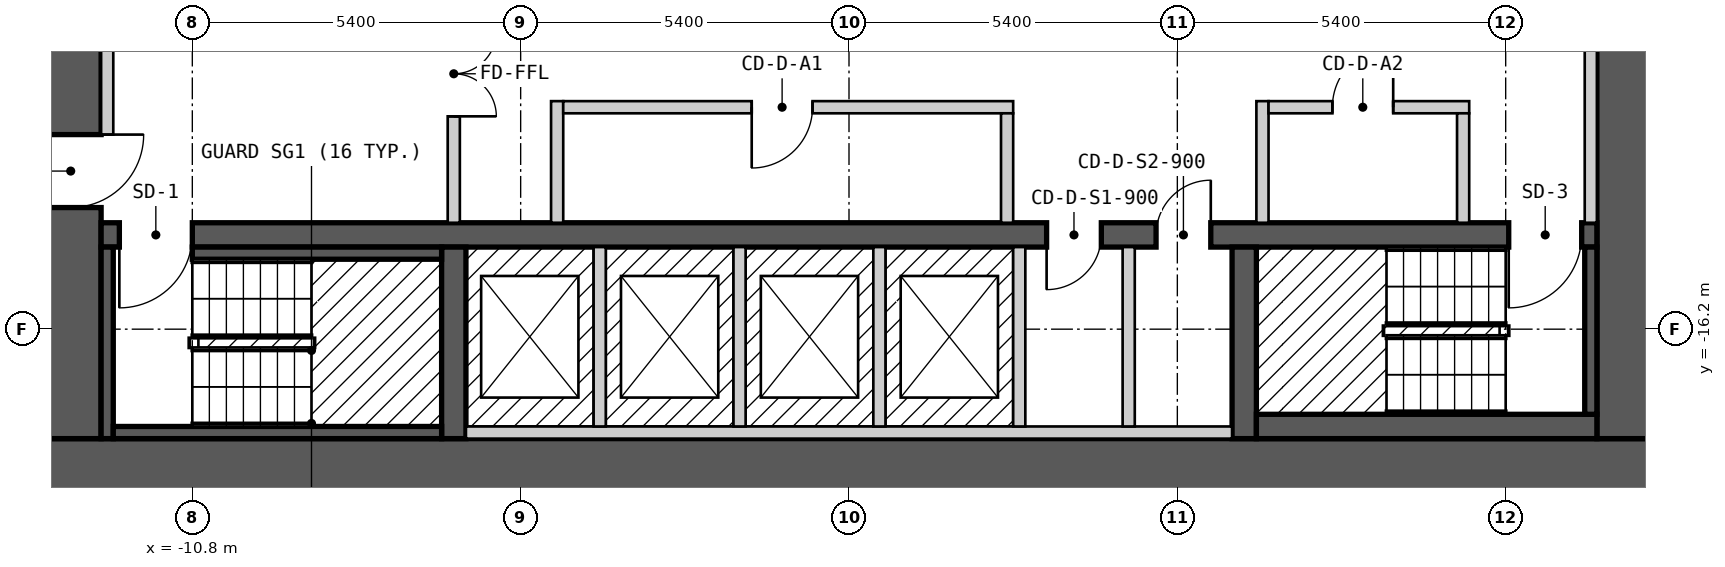
"""IFC4 building model, lengths in metres.
Left out: names, types, materials, properties, quantities, classifications, styles, units other than length and angle.
Written with IfcOpenShell. Run it as: python <this file> out.ifc"""

import sys

from ifc_helpers import new_model, si_unit, direction, frame, frame_2d, origin, place, context, subcontext, project, spatial, rectangle, extrude, element, fill, save


model = new_model("IFC4")
c1 = context("Model", 3, precision=1e-05, world=origin(), true_north=direction((0.0, 1.0)))
c2 = subcontext(c1, "Body", "Model", "MODEL_VIEW")
j1 = project(units=[si_unit("LENGTHUNIT", "METRE"), si_unit("PLANEANGLEUNIT", "RADIAN")], contexts=[c1])
p1 = place(None, origin())
s1 = spatial("IfcSite", under=j1, at=p1, CompositionType="ELEMENT")
p2 = place(p1, origin())
s2 = spatial("IfcBuilding", under=s1, at=p2, CompositionType="ELEMENT")
p3 = place(p2, frame((0.0, 0.0, 81.0)))
s3 = spatial("IfcBuildingStorey", under=s2, at=p3, CompositionType="ELEMENT", Elevation=81.0)
p4 = place(p3, frame((-13.3, -18.5, 0.0), z_axis=(0.0, 0.0, 1.0), x_axis=(1.0, 0.0, 0.0)))
e1 = element("IfcWall", 1, at=p4, inside=s3, PredefinedType="SHEAR", context=c2, shape_type="SweptSolid", body=[
    extrude(rectangle(XDim=26.6, YDim=1.0, at=frame_2d((13.3, 0.0))), origin(), (0.0, 0.0, 1.0), 2.7),
])
p5 = place(p3, frame((-12.8, -18.0, 0.0), z_axis=(0.0, 0.0, 1.0), x_axis=(0.0, 1.0, 0.0)))
e2 = element("IfcWall", 2, at=p5, inside=s3, PredefinedType="SHEAR", context=c2, shape_type="SweptSolid", body=[
    extrude(rectangle(XDim=12.0, YDim=1.0, at=frame_2d((6.0, 0.0))), origin(), (0.0, 0.0, 1.0), 2.7),
])
p6 = place(p5, frame((3.8, 0.0, 0.0)))
e3 = element("IfcOpeningElement", 3, at=p6, cuts=e2, PredefinedType="OPENING", context=c2, shape_type="SweptSolid", body=[
    extrude(rectangle(XDim=1.2, YDim=2.1, at=frame_2d((0.6, 1.05))), frame((0.0, 0.51, 0.0), z_axis=(0.0, -1.0, 0.0), x_axis=(1.0, 0.0, 0.0)), (0.0, 0.0, 1.0), 1.02),
])
p7 = place(p3, frame((12.8, -18.0, 0.0), z_axis=(0.0, 0.0, 1.0), x_axis=(0.0, 1.0, 0.0)))
e4 = element("IfcWall", 4, at=p7, inside=s3, PredefinedType="SHEAR", context=c2, shape_type="SweptSolid", body=[
    extrude(rectangle(XDim=12.0, YDim=1.0, at=frame_2d((6.0, 0.0))), origin(), (0.0, 0.0, 1.0), 2.7),
])
p8 = place(p3, frame((-12.3, -14.65, 0.0), z_axis=(0.0, 0.0, 1.0), x_axis=(1.0, 0.0, 0.0)))
e5 = element("IfcWall", 5, at=p8, inside=s3, PredefinedType="SHEAR", context=c2, shape_type="SweptSolid", body=[
    extrude(rectangle(XDim=24.6, YDim=0.4, at=frame_2d((12.3, 0.0))), origin(), (0.0, 0.0, 1.0), 2.7),
])
p9 = place(p8, frame((1.5, 0.0, 0.0), z_axis=(0.0, 0.0, 1.0), x_axis=(-1.0, 0.0, 0.0)))
e6 = element("IfcOpeningElement", 6, at=p9, cuts=e5, PredefinedType="OPENING", context=c2, shape_type="SweptSolid", body=[
    extrude(rectangle(XDim=1.2, YDim=2.1, at=frame_2d((0.6, 1.05))), frame((0.0, 0.21, 0.0), z_axis=(0.0, -1.0, 0.0), x_axis=(1.0, 0.0, 0.0)), (0.0, 0.0, 1.0), 0.42),
])
p10 = place(p8, frame((24.35, 0.0, 0.0), z_axis=(0.0, 0.0, 1.0), x_axis=(-1.0, 0.0, 0.0)))
e7 = element("IfcOpeningElement", 7, at=p10, cuts=e5, PredefinedType="OPENING", context=c2, shape_type="SweptSolid", body=[
    extrude(rectangle(XDim=1.2, YDim=2.1, at=frame_2d((0.6, 1.05))), frame((0.0, 0.21, 0.0), z_axis=(0.0, -1.0, 0.0), x_axis=(1.0, 0.0, 0.0)), (0.0, 0.0, 1.0), 0.42),
])
p11 = place(p8, frame((16.45, 0.0, 0.0), z_axis=(0.0, 0.0, 1.0), x_axis=(-1.0, 0.0, 0.0)))
e8 = element("IfcOpeningElement", 8, at=p11, cuts=e5, PredefinedType="OPENING", context=c2, shape_type="SweptSolid", body=[
    extrude(rectangle(XDim=0.9, YDim=2.1, at=frame_2d((0.45, 1.05))), frame((0.0, 0.21, 0.0), z_axis=(0.0, -1.0, 0.0), x_axis=(1.0, 0.0, 0.0)), (0.0, 0.0, 1.0), 0.42),
])
p12 = place(p8, frame((18.25, 0.0, 0.0), z_axis=(0.0, 0.0, 1.0), x_axis=(-1.0, 0.0, 0.0)))
e9 = element("IfcOpeningElement", 9, at=p12, cuts=e5, PredefinedType="OPENING", context=c2, shape_type="SweptSolid", body=[
    extrude(rectangle(XDim=0.9, YDim=2.1, at=frame_2d((0.45, 1.05))), frame((0.0, 0.21, 0.0), z_axis=(0.0, -1.0, 0.0), x_axis=(1.0, 0.0, 0.0)), (0.0, 0.0, 1.0), 0.42),
])
for number, where, z_axis, x_axis in (
    (10, (-6.5, -18.0, 0.0), (0.0, 0.0, 1.0), (0.0, 1.0, 0.0)),
    (11, (6.5, -18.0, 0.0), (0.0, 0.0, 1.0), (0.0, 1.0, 0.0)),
):
    element("IfcWall", number, at=place(p3, frame(where, z_axis=z_axis, x_axis=x_axis)), inside=s3, PredefinedType="SHEAR", context=c2, shape_type="SweptSolid", body=[
        extrude(rectangle(XDim=3.15, YDim=0.4, at=frame_2d((1.575, 0.0))), origin(), (0.0, 0.0, 1.0), 2.7),
    ])
p13 = place(p3, frame((-12.2, -18.0, 0.0), z_axis=(0.0, 0.0, 1.0), x_axis=(0.0, 1.0, 0.0)))
e12 = element("IfcWall", 12, at=p13, inside=s3, PredefinedType="SOLIDWALL", context=c2, shape_type="SweptSolid", body=[
    extrude(rectangle(XDim=3.15, YDim=0.2, at=frame_2d((1.575, 0.0))), origin(), (0.0, 0.0, 1.0), 2.7),
])
p14 = place(p3, frame((-12.2, -13.0, 0.0), z_axis=(0.0, 0.0, 1.0), x_axis=(0.0, 1.0, 0.0)))
e13 = element("IfcWall", 13, at=p14, inside=s3, PredefinedType="PARTITIONING", context=c2, shape_type="SweptSolid", body=[
    extrude(rectangle(XDim=3.45, YDim=0.2, at=frame_2d((1.725, 0.0))), origin(), (0.0, 0.0, 1.0), 2.7),
])
p15 = place(p3, frame((-12.1, -17.9, 0.0), z_axis=(0.0, 0.0, 1.0), x_axis=(1.0, 0.0, 0.0)))
e14 = element("IfcWall", 14, at=p15, inside=s3, PredefinedType="SOLIDWALL", context=c2, shape_type="SweptSolid", body=[
    extrude(rectangle(XDim=5.4, YDim=0.2, at=frame_2d((2.7, 0.0))), origin(), (0.0, 0.0, 1.0), 2.7),
])
p16 = place(p3, frame((-10.8, -14.95, 0.0), z_axis=(0.0, 0.0, 1.0), x_axis=(1.0, 0.0, 0.0)))
e15 = element("IfcWall", 15, at=p16, inside=s3, PredefinedType="SOLIDWALL", context=c2, shape_type="SweptSolid", body=[
    extrude(rectangle(XDim=4.1, YDim=0.2, at=frame_2d((2.05, 0.0))), origin(), (0.0, 0.0, 1.0), 2.7),
])
p17 = place(p3, frame((-6.5, -14.45, 0.0), z_axis=(0.0, 0.0, 1.0), x_axis=(0.0, 1.0, 0.0)))
e16 = element("IfcWall", 16, at=p17, inside=s3, PredefinedType="PARTITIONING", context=c2, shape_type="SweptSolid", body=[
    extrude(rectangle(XDim=4.9, YDim=0.2, at=frame_2d((2.45, 0.0))), origin(), (0.0, 0.0, 1.0), 2.7),
])
p18 = place(p17, frame((3.15, 0.0, 0.0), z_axis=(0.0, 0.0, 1.0), x_axis=(-1.0, 0.0, 0.0)))
e17 = element("IfcOpeningElement", 17, at=p18, cuts=e16, PredefinedType="OPENING", context=c2, shape_type="SweptSolid", body=[
    extrude(rectangle(XDim=1.4, YDim=2.1, at=frame_2d((0.7, 1.05))), frame((0.0, 0.11, 0.0), z_axis=(0.0, -1.0, 0.0), x_axis=(1.0, 0.0, 0.0)), (0.0, 0.0, 1.0), 0.22),
])
p19 = place(p3, frame((-6.3, -17.9, 0.0), z_axis=(0.0, 0.0, 1.0), x_axis=(1.0, 0.0, 0.0)))
e18 = element("IfcWall", 18, at=p19, inside=s3, PredefinedType="SOLIDWALL", context=c2, shape_type="SweptSolid", body=[
    extrude(rectangle(XDim=12.6, YDim=0.2, at=frame_2d((6.3, 0.0))), origin(), (0.0, 0.0, 1.0), 2.7),
])
p20 = place(p3, frame((-4.8, -14.45, 0.0), z_axis=(0.0, 0.0, 1.0), x_axis=(0.0, 1.0, 0.0)))
e19 = element("IfcWall", 19, at=p20, inside=s3, PredefinedType="PARTITIONING", context=c2, shape_type="SweptSolid", body=[
    extrude(rectangle(XDim=2.0, YDim=0.2, at=frame_2d((1.0, 0.0))), origin(), (0.0, 0.0, 1.0), 2.7),
])
p21 = place(p3, frame((-4.7, -12.55, 0.0), z_axis=(0.0, 0.0, 1.0), x_axis=(1.0, 0.0, 0.0)))
e20 = element("IfcWall", 20, at=p21, inside=s3, PredefinedType="PARTITIONING", context=c2, shape_type="SweptSolid", body=[
    extrude(rectangle(XDim=7.4, YDim=0.2, at=frame_2d((3.7, 0.0))), origin(), (0.0, 0.0, 1.0), 2.7),
])
p22 = place(p21, frame((4.1, 0.0, 0.0), z_axis=(0.0, 0.0, 1.0), x_axis=(-1.0, 0.0, 0.0)))
e21 = element("IfcOpeningElement", 21, at=p22, cuts=e20, PredefinedType="OPENING", context=c2, shape_type="SweptSolid", body=[
    extrude(rectangle(XDim=1.0, YDim=2.1, at=frame_2d((0.5, 1.05))), frame((0.0, 0.11, 0.0), z_axis=(0.0, -1.0, 0.0), x_axis=(1.0, 0.0, 0.0)), (0.0, 0.0, 1.0), 0.22),
])
for number, where, z_axis, x_axis in (
    (22, (-4.1, -17.8, 0.0), (0.0, 0.0, 1.0), (0.0, 1.0, 0.0)),
    (23, (-1.8, -17.8, 0.0), (0.0, 0.0, 1.0), (0.0, 1.0, 0.0)),
    (24, (0.5, -17.8, 0.0), (0.0, 0.0, 1.0), (0.0, 1.0, 0.0)),
):
    element("IfcWall", number, at=place(p3, frame(where, z_axis=z_axis, x_axis=x_axis)), inside=s3, PredefinedType="SOLIDWALL", context=c2, shape_type="SweptSolid", body=[
        extrude(rectangle(XDim=2.95, YDim=0.2, at=frame_2d((1.475, 0.0))), origin(), (0.0, 0.0, 1.0), 2.7),
    ])
p23 = place(p3, frame((2.6, -14.45, 0.0), z_axis=(0.0, 0.0, 1.0), x_axis=(0.0, 1.0, 0.0)))
e25 = element("IfcWall", 25, at=p23, inside=s3, PredefinedType="PARTITIONING", context=c2, shape_type="SweptSolid", body=[
    extrude(rectangle(XDim=1.8, YDim=0.2, at=frame_2d((0.9, 0.0))), origin(), (0.0, 0.0, 1.0), 2.7),
])
p24 = place(p3, frame((2.8, -17.8, 0.0), z_axis=(0.0, 0.0, 1.0), x_axis=(0.0, 1.0, 0.0)))
e26 = element("IfcWall", 26, at=p24, inside=s3, PredefinedType="SOLIDWALL", context=c2, shape_type="SweptSolid", body=[
    extrude(rectangle(XDim=2.95, YDim=0.2, at=frame_2d((1.475, 0.0))), origin(), (0.0, 0.0, 1.0), 2.7),
])
p25 = place(p3, frame((4.6, -17.8, 0.0), z_axis=(0.0, 0.0, 1.0), x_axis=(0.0, 1.0, 0.0)))
e27 = element("IfcWall", 27, at=p25, inside=s3, PredefinedType="PARTITIONING", context=c2, shape_type="SweptSolid", body=[
    extrude(rectangle(XDim=2.95, YDim=0.2, at=frame_2d((1.475, 0.0))), origin(), (0.0, 0.0, 1.0), 2.7),
])
p26 = place(p3, frame((6.7, -17.8, 0.0), z_axis=(0.0, 0.0, 1.0), x_axis=(1.0, 0.0, 0.0)))
e28 = element("IfcWall", 28, at=p26, inside=s3, PredefinedType="SOLIDWALL", context=c2, shape_type="SweptSolid", body=[
    extrude(rectangle(XDim=5.6, YDim=0.4, at=frame_2d((2.8, 0.0))), origin(), (0.0, 0.0, 1.0), 2.7),
])
p27 = place(p3, frame((6.8, -14.45, 0.0), z_axis=(0.0, 0.0, 1.0), x_axis=(0.0, 1.0, 0.0)))
e29 = element("IfcWall", 29, at=p27, inside=s3, PredefinedType="PARTITIONING", context=c2, shape_type="SweptSolid", body=[
    extrude(rectangle(XDim=2.0, YDim=0.2, at=frame_2d((1.0, 0.0))), origin(), (0.0, 0.0, 1.0), 2.7),
])
p28 = place(p3, frame((6.9, -12.55, 0.0), z_axis=(0.0, 0.0, 1.0), x_axis=(1.0, 0.0, 0.0)))
e30 = element("IfcWall", 30, at=p28, inside=s3, PredefinedType="PARTITIONING", context=c2, shape_type="SweptSolid", body=[
    extrude(rectangle(XDim=3.3, YDim=0.2, at=frame_2d((1.65, 0.0))), origin(), (0.0, 0.0, 1.0), 2.7),
])
p29 = place(p28, frame((2.05, 0.0, 0.0), z_axis=(0.0, 0.0, 1.0), x_axis=(-1.0, 0.0, 0.0)))
e31 = element("IfcOpeningElement", 31, at=p29, cuts=e30, PredefinedType="OPENING", context=c2, shape_type="SweptSolid", body=[
    extrude(rectangle(XDim=1.0, YDim=2.1, at=frame_2d((0.5, 1.05))), frame((0.0, 0.11, 0.0), z_axis=(0.0, -1.0, 0.0), x_axis=(1.0, 0.0, 0.0)), (0.0, 0.0, 1.0), 0.22),
])
p30 = place(p3, frame((10.1, -14.45, 0.0), z_axis=(0.0, 0.0, 1.0), x_axis=(0.0, 1.0, 0.0)))
e32 = element("IfcWall", 32, at=p30, inside=s3, PredefinedType="PARTITIONING", context=c2, shape_type="SweptSolid", body=[
    extrude(rectangle(XDim=1.8, YDim=0.2, at=frame_2d((0.9, 0.0))), origin(), (0.0, 0.0, 1.0), 2.7),
])
p31 = place(p3, frame((12.2, -17.6, 0.0), z_axis=(0.0, 0.0, 1.0), x_axis=(0.0, 1.0, 0.0)))
e33 = element("IfcWall", 33, at=p31, inside=s3, PredefinedType="SOLIDWALL", context=c2, shape_type="SweptSolid", body=[
    extrude(rectangle(XDim=2.75, YDim=0.2, at=frame_2d((1.375, 0.0))), origin(), (0.0, 0.0, 1.0), 2.7),
])
p32 = place(p3, frame((12.2, -14.45, 0.0), z_axis=(0.0, 0.0, 1.0), x_axis=(0.0, 1.0, 0.0)))
e34 = element("IfcWall", 34, at=p32, inside=s3, PredefinedType="PARTITIONING", context=c2, shape_type="SweptSolid", body=[
    extrude(rectangle(XDim=8.25, YDim=0.2, at=frame_2d((4.125, 0.0))), origin(), (0.0, 0.0, 1.0), 2.7),
])
p33 = place(p9, origin())
e35 = element("IfcDoor", 35, at=p33, inside=s3, OperationType="SINGLE_SWING_RIGHT", PredefinedType="DOOR", context=c2, shape_type="SweptSolid", body=[
    extrude(rectangle(XDim=1.2, YDim=2.1, at=frame_2d((0.6, 1.05))), frame((0.0, 0.025, 0.0), z_axis=(0.0, -1.0, 0.0), x_axis=(1.0, 0.0, 0.0)), (0.0, 0.0, 1.0), 0.05),
])
fill(e6, e35)
p34 = place(p10, origin())
e36 = element("IfcDoor", 36, at=p34, inside=s3, OperationType="SINGLE_SWING_RIGHT", PredefinedType="DOOR", context=c2, shape_type="SweptSolid", body=[
    extrude(rectangle(XDim=1.2, YDim=2.1, at=frame_2d((0.6, 1.05))), frame((0.0, 0.025, 0.0), z_axis=(0.0, -1.0, 0.0), x_axis=(1.0, 0.0, 0.0)), (0.0, 0.0, 1.0), 0.05),
])
fill(e7, e36)
p35 = place(p6, origin())
e37 = element("IfcDoor", 37, at=p35, inside=s3, OperationType="SINGLE_SWING_RIGHT", PredefinedType="DOOR", context=c2, shape_type="SweptSolid", body=[
    extrude(rectangle(XDim=1.2, YDim=2.1, at=frame_2d((0.6, 1.05))), frame((0.0, 0.025, 0.0), z_axis=(0.0, -1.0, 0.0), x_axis=(1.0, 0.0, 0.0)), (0.0, 0.0, 1.0), 0.05),
])
fill(e3, e37)
p36 = place(p18, origin())
e38 = element("IfcDoor", 38, at=p36, inside=s3, OperationType="DOUBLE_DOOR_SINGLE_SWING", PredefinedType="DOOR", context=c2, shape_type="SweptSolid", body=[
    extrude(rectangle(XDim=1.4, YDim=2.1, at=frame_2d((0.7, 1.05))), frame((0.0, 0.025, 0.0), z_axis=(0.0, -1.0, 0.0), x_axis=(1.0, 0.0, 0.0)), (0.0, 0.0, 1.0), 0.05),
])
fill(e17, e38)
p37 = place(p22, origin())
e39 = element("IfcDoor", 39, at=p37, inside=s3, OperationType="SINGLE_SWING_RIGHT", PredefinedType="DOOR", context=c2, shape_type="SweptSolid", body=[
    extrude(rectangle(XDim=1.0, YDim=2.1, at=frame_2d((0.5, 1.05))), frame((0.0, 0.025, 0.0), z_axis=(0.0, -1.0, 0.0), x_axis=(1.0, 0.0, 0.0)), (0.0, 0.0, 1.0), 0.05),
])
fill(e21, e39)
p38 = place(p29, origin())
e40 = element("IfcDoor", 40, at=p38, inside=s3, OperationType="SINGLE_SWING_LEFT", PredefinedType="DOOR", context=c2, shape_type="SweptSolid", body=[
    extrude(rectangle(XDim=1.0, YDim=2.1, at=frame_2d((0.5, 1.05))), frame((0.0, 0.025, 0.0), z_axis=(0.0, -1.0, 0.0), x_axis=(1.0, 0.0, 0.0)), (0.0, 0.0, 1.0), 0.05),
])
fill(e31, e40)
p39 = place(p11, origin())
e41 = element("IfcDoor", 41, at=p39, inside=s3, OperationType="SINGLE_SWING_RIGHT", PredefinedType="DOOR", context=c2, shape_type="SweptSolid", body=[
    extrude(rectangle(XDim=0.9, YDim=2.1, at=frame_2d((0.45, 1.05))), frame((0.0, 0.025, 0.0), z_axis=(0.0, -1.0, 0.0), x_axis=(1.0, 0.0, 0.0)), (0.0, 0.0, 1.0), 0.05),
])
fill(e8, e41)
p40 = place(p12, origin())
e42 = element("IfcDoor", 42, at=p40, inside=s3, OperationType="SINGLE_SWING_LEFT", PredefinedType="DOOR", context=c2, shape_type="SweptSolid", body=[
    extrude(rectangle(XDim=0.9, YDim=2.1, at=frame_2d((0.45, 1.05))), frame((0.0, 0.025, 0.0), z_axis=(0.0, -1.0, 0.0), x_axis=(1.0, 0.0, 0.0)), (0.0, 0.0, 1.0), 0.05),
])
fill(e9, e42)
save(model, sys.argv[1])
